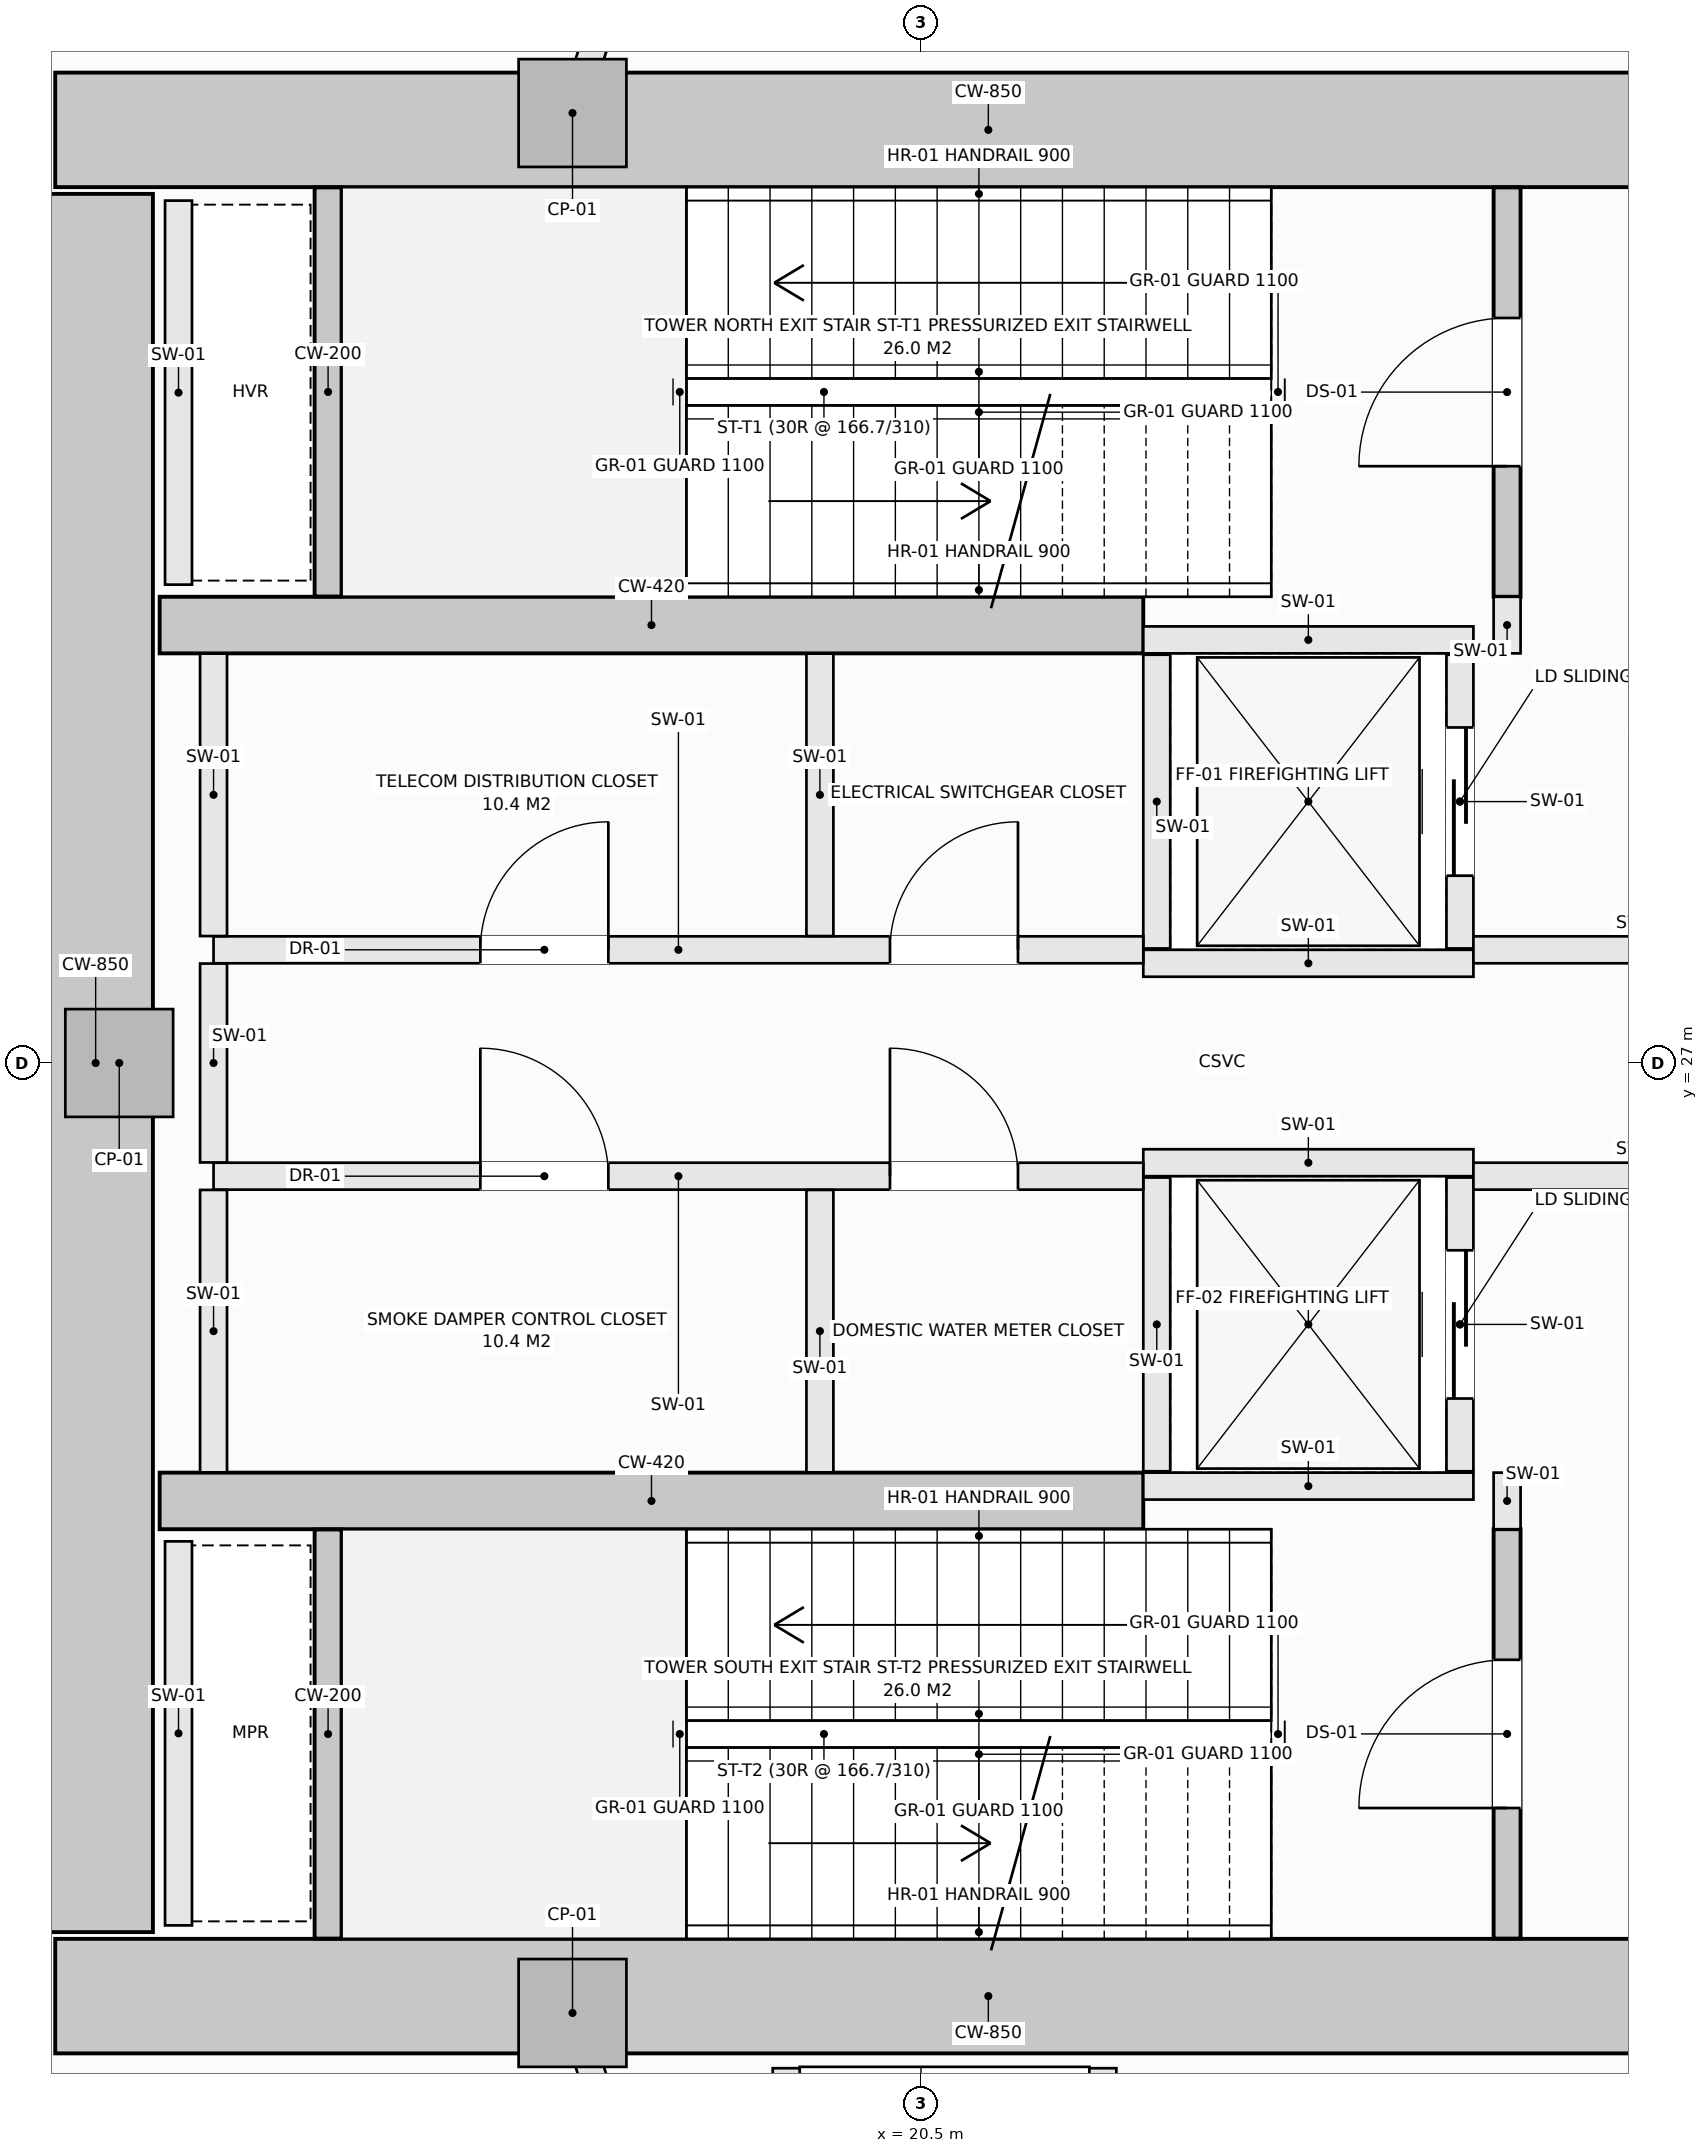
"""IFC4 building model, lengths in metres.
Left out: names, types, materials, properties, quantities, classifications, styles, units other than length and angle.
Written with IfcOpenShell. Run it as: python <this file> out.ifc"""

import sys

from ifc_helpers import new_model, si_unit, direction, frame, frame_2d, origin, origin_2d, place, context, subcontext, project, spatial, rectangle, extrude, element, fill, save


model = new_model("IFC4")
c1 = context("Model", 3, precision=1e-05, world=origin(), true_north=direction((0.0, 1.0)))
c2 = subcontext(c1, "Body", "Model", "MODEL_VIEW")
j1 = project(units=[si_unit("LENGTHUNIT", "METRE"), si_unit("PLANEANGLEUNIT", "RADIAN")], contexts=[c1])
p1 = place(None, origin())
s1 = spatial("IfcSite", under=j1, at=p1, CompositionType="ELEMENT")
p2 = place(p1, origin())
s2 = spatial("IfcBuilding", under=s1, at=p2, CompositionType="ELEMENT")
p3 = place(p2, frame((0.0, 0.0, 95.8)))
s3 = spatial("IfcBuildingStorey", under=s2, at=p3, CompositionType="ELEMENT", Elevation=95.8)
for number, where, z_axis, x_axis in (
    (1, (14.075, 33.925, -0.32), (0.0, 0.0, 1.0), (1.0, 0.0, 0.0)),
    (2, (14.075, 20.075, -0.32), (0.0, 0.0, 1.0), (1.0, 0.0, 0.0)),
):
    element("IfcWall", number, at=place(p3, frame(where, z_axis=z_axis, x_axis=x_axis)), inside=s3, PredefinedType="SHEAR", context=c2, shape_type="SweptSolid", body=[
        extrude(rectangle(XDim=13.85, YDim=0.85, at=frame_2d((6.925, 0.0))), origin(), (0.0, 0.0, 1.0), 5.04),
    ])
p4 = place(p3, frame((14.375, 20.55, -0.32), z_axis=(0.0, 0.0, 1.0), x_axis=(0.0, 1.0, 0.0)))
e3 = element("IfcWall", 3, at=p4, inside=s3, PredefinedType="SHEAR", context=c2, shape_type="SweptSolid", body=[
    extrude(rectangle(XDim=12.9, YDim=0.85, at=frame_2d((6.45, 0.0))), origin(), (0.0, 0.0, 1.0), 5.04),
])
for number, where, z_axis, x_axis in (
    (4, (14.85, 30.25, -0.32), (0.0, 0.0, 1.0), (1.0, 0.0, 0.0)),
    (5, (14.85, 23.75, -0.32), (0.0, 0.0, 1.0), (1.0, 0.0, 0.0)),
):
    element("IfcWall", number, at=place(p3, frame(where, z_axis=z_axis, x_axis=x_axis)), inside=s3, PredefinedType="SHEAR", context=c2, shape_type="SweptSolid", body=[
        extrude(rectangle(XDim=7.3, YDim=0.42, at=frame_2d((3.65, 0.0))), origin(), (0.0, 0.0, 1.0), 5.04),
    ])
for number, where, z_axis, x_axis in (
    (6, (17.914, 34.05, -0.32), (0.0, 0.0, 1.0), (1.0, 0.0, 0.0)),
    (7, (14.55, 27.0, -0.32), (0.0, 0.0, 1.0), (1.0, 0.0, 0.0)),
    (8, (17.914, 19.95, -0.32), (0.0, 0.0, 1.0), (1.0, 0.0, 0.0)),
):
    element("IfcColumn", number, at=place(p3, frame(where, z_axis=z_axis, x_axis=x_axis)), inside=s3, PredefinedType="PILASTER", context=c2, shape_type="SweptSolid", body=[
        extrude(rectangle(XDim=0.8, YDim=0.8, at=origin_2d()), origin(), (0.0, 0.0, 1.0), 5.04),
    ])
p5 = place(p3, frame((24.85, 30.46, -0.32), z_axis=(0.0, 0.0, 1.0), x_axis=(0.0, 1.0, 0.0)))
e9 = element("IfcWall", 9, at=p5, inside=s3, PredefinedType="SHEAR", context=c2, shape_type="SweptSolid", body=[
    extrude(rectangle(XDim=3.038, YDim=0.2, at=frame_2d((1.519, 0.0))), origin(), (0.0, 0.0, 1.0), 5.04),
])
p6 = place(p5, frame((0.969, 0.0, 0.32)))
e10 = element("IfcOpeningElement", 10, at=p6, cuts=e9, PredefinedType="OPENING", context=c2, shape_type="SweptSolid", body=[
    extrude(rectangle(XDim=1.1, YDim=2.15, at=frame_2d((0.55, 1.075))), frame((0.0, 0.11, 0.0), z_axis=(0.0, -1.0, 0.0), x_axis=(1.0, 0.0, 0.0)), (0.0, 0.0, 1.0), 0.22),
])
p7 = place(p3, frame((16.1, 30.462, -0.32), z_axis=(0.0, 0.0, 1.0), x_axis=(0.0, 1.0, 0.0)))
e11 = element("IfcWall", 11, at=p7, inside=s3, PredefinedType="SHEAR", context=c2, shape_type="SweptSolid", body=[
    extrude(rectangle(XDim=3.036, YDim=0.2, at=frame_2d((1.518, 0.0))), origin(), (0.0, 0.0, 1.0), 5.04),
])
p8 = place(p3, frame((24.85, 20.502, -0.32), z_axis=(0.0, 0.0, 1.0), x_axis=(0.0, 1.0, 0.0)))
e12 = element("IfcWall", 12, at=p8, inside=s3, PredefinedType="SHEAR", context=c2, shape_type="SweptSolid", body=[
    extrude(rectangle(XDim=3.038, YDim=0.2, at=frame_2d((1.519, 0.0))), origin(), (0.0, 0.0, 1.0), 5.04),
])
p9 = place(p8, frame((0.969, 0.0, 0.32)))
e13 = element("IfcOpeningElement", 13, at=p9, cuts=e12, PredefinedType="OPENING", context=c2, shape_type="SweptSolid", body=[
    extrude(rectangle(XDim=1.1, YDim=2.15, at=frame_2d((0.55, 1.075))), frame((0.0, 0.11, 0.0), z_axis=(0.0, -1.0, 0.0), x_axis=(1.0, 0.0, 0.0)), (0.0, 0.0, 1.0), 0.22),
])
p10 = place(p3, frame((16.1, 20.502, -0.32), z_axis=(0.0, 0.0, 1.0), x_axis=(0.0, 1.0, 0.0)))
e14 = element("IfcWall", 14, at=p10, inside=s3, PredefinedType="SHEAR", context=c2, shape_type="SweptSolid", body=[
    extrude(rectangle(XDim=3.036, YDim=0.2, at=frame_2d((1.518, 0.0))), origin(), (0.0, 0.0, 1.0), 5.04),
])
for number, where, z_axis, x_axis in (
    (15, (22.15, 30.14, 0.0), (0.0, 0.0, 1.0), (1.0, 0.0, 0.0)),
    (16, (22.15, 27.74, 0.0), (0.0, 0.0, 1.0), (1.0, 0.0, 0.0)),
):
    element("IfcWall", number, at=place(p3, frame(where, z_axis=z_axis, x_axis=x_axis)), inside=s3, PredefinedType="SOLIDWALL", context=c2, shape_type="SweptSolid", body=[
        extrude(rectangle(XDim=2.45, YDim=0.2, at=frame_2d((1.225, 0.0))), origin(), (0.0, 0.0, 1.0), 4.72),
    ])
p11 = place(p3, frame((22.25, 27.85, 0.0), z_axis=(0.0, 0.0, 1.0), x_axis=(0.0, 1.0, 0.0)))
e17 = element("IfcWall", 17, at=p11, inside=s3, PredefinedType="SOLIDWALL", context=c2, shape_type="SweptSolid", body=[
    extrude(rectangle(XDim=2.18, YDim=0.2, at=frame_2d((1.09, 0.0))), origin(), (0.0, 0.0, 1.0), 4.72),
])
p12 = place(p3, frame((24.5, 27.85, 0.0), z_axis=(0.0, 0.0, 1.0), x_axis=(0.0, 1.0, 0.0)))
e18 = element("IfcWall", 18, at=p12, inside=s3, PredefinedType="SOLIDWALL", context=c2, shape_type="SweptSolid", body=[
    extrude(rectangle(XDim=2.18, YDim=0.2, at=frame_2d((1.09, 0.0))), origin(), (0.0, 0.0, 1.0), 4.72),
])
p13 = place(p12, frame((0.54, 0.0, 0.0)))
e19 = element("IfcOpeningElement", 19, at=p13, cuts=e18, PredefinedType="OPENING", context=c2, shape_type="SweptSolid", body=[
    extrude(rectangle(XDim=1.1, YDim=2.2, at=frame_2d((0.55, 1.1))), frame((0.0, 0.11, 0.0), z_axis=(0.0, -1.0, 0.0), x_axis=(1.0, 0.0, 0.0)), (0.0, 0.0, 1.0), 0.22),
])
for number, where, z_axis, x_axis in (
    (20, (22.15, 26.26, 0.0), (0.0, 0.0, 1.0), (1.0, 0.0, 0.0)),
    (21, (22.15, 23.86, 0.0), (0.0, 0.0, 1.0), (1.0, 0.0, 0.0)),
):
    element("IfcWall", number, at=place(p3, frame(where, z_axis=z_axis, x_axis=x_axis)), inside=s3, PredefinedType="SOLIDWALL", context=c2, shape_type="SweptSolid", body=[
        extrude(rectangle(XDim=2.45, YDim=0.2, at=frame_2d((1.225, 0.0))), origin(), (0.0, 0.0, 1.0), 4.72),
    ])
p14 = place(p3, frame((22.25, 23.97, 0.0), z_axis=(0.0, 0.0, 1.0), x_axis=(0.0, 1.0, 0.0)))
e22 = element("IfcWall", 22, at=p14, inside=s3, PredefinedType="SOLIDWALL", context=c2, shape_type="SweptSolid", body=[
    extrude(rectangle(XDim=2.18, YDim=0.2, at=frame_2d((1.09, 0.0))), origin(), (0.0, 0.0, 1.0), 4.72),
])
p15 = place(p3, frame((24.5, 23.97, 0.0), z_axis=(0.0, 0.0, 1.0), x_axis=(0.0, 1.0, 0.0)))
e23 = element("IfcWall", 23, at=p15, inside=s3, PredefinedType="SOLIDWALL", context=c2, shape_type="SweptSolid", body=[
    extrude(rectangle(XDim=2.18, YDim=0.2, at=frame_2d((1.09, 0.0))), origin(), (0.0, 0.0, 1.0), 4.72),
])
p16 = place(p15, frame((0.54, 0.0, 0.0)))
e24 = element("IfcOpeningElement", 24, at=p16, cuts=e23, PredefinedType="OPENING", context=c2, shape_type="SweptSolid", body=[
    extrude(rectangle(XDim=1.1, YDim=2.2, at=frame_2d((0.55, 1.1))), frame((0.0, 0.11, 0.0), z_axis=(0.0, -1.0, 0.0), x_axis=(1.0, 0.0, 0.0)), (0.0, 0.0, 1.0), 0.22),
])
for number, where, z_axis, x_axis in (
    (25, (19.5, 17.01, 0.0), (0.0, 0.0, 1.0), (0.0, 1.0, 0.0)),
    (26, (21.85, 17.01, 0.0), (0.0, 0.0, 1.0), (0.0, 1.0, 0.0)),
):
    element("IfcWall", number, at=place(p3, frame(where, z_axis=z_axis, x_axis=x_axis)), inside=s3, PredefinedType="SOLIDWALL", context=c2, shape_type="SweptSolid", body=[
        extrude(rectangle(XDim=2.53, YDim=0.2, at=frame_2d((1.265, 0.0))), origin(), (0.0, 0.0, 1.0), 4.72),
    ])
for number, where, z_axis, x_axis in (
    (27, (14.99, 30.55, 0.0), (0.0, 0.0, 1.0), (0.0, 1.0, 0.0)),
    (28, (14.99, 20.6, 0.0), (0.0, 0.0, 1.0), (0.0, 1.0, 0.0)),
):
    element("IfcWall", number, at=place(p3, frame(where, z_axis=z_axis, x_axis=x_axis)), inside=s3, PredefinedType="SOLIDWALL", context=c2, shape_type="SweptSolid", body=[
        extrude(rectangle(XDim=2.85, YDim=0.2, at=frame_2d((1.425, 0.0))), origin(), (0.0, 0.0, 1.0), 4.72),
    ])
for number, where, z_axis, x_axis in (
    (29, (24.85, 23.54, 0.0), (0.0, 0.0, 1.0), (0.0, 1.0, 0.0)),
    (30, (24.85, 30.04, 0.0), (0.0, 0.0, 1.0), (0.0, 1.0, 0.0)),
):
    element("IfcWall", number, at=place(p3, frame(where, z_axis=z_axis, x_axis=x_axis)), inside=s3, PredefinedType="SOLIDWALL", context=c2, shape_type="SweptSolid", body=[
        extrude(rectangle(XDim=0.42, YDim=0.2, at=frame_2d((0.21, 0.0))), origin(), (0.0, 0.0, 1.0), 4.72),
    ])
p17 = place(p3, frame((15.25, 27.84, 0.0), z_axis=(0.0, 0.0, 1.0), x_axis=(1.0, 0.0, 0.0)))
e31 = element("IfcWall", 31, at=p17, inside=s3, PredefinedType="SOLIDWALL", context=c2, shape_type="SweptSolid", body=[
    extrude(rectangle(XDim=6.9, YDim=0.2, at=frame_2d((3.45, 0.0))), origin(), (0.0, 0.0, 1.0), 4.72),
])
p18 = place(p17, frame((5.02, 0.0, 0.0)))
e32 = element("IfcOpeningElement", 32, at=p18, cuts=e31, PredefinedType="OPENING", context=c2, shape_type="SweptSolid", body=[
    extrude(rectangle(XDim=0.95, YDim=2.1, at=frame_2d((0.475, 1.05))), frame((0.0, 0.11, 0.0), z_axis=(0.0, -1.0, 0.0), x_axis=(1.0, 0.0, 0.0)), (0.0, 0.0, 1.0), 0.22),
])
p19 = place(p17, frame((1.98, 0.0, 0.0)))
e33 = element("IfcOpeningElement", 33, at=p19, cuts=e31, PredefinedType="OPENING", context=c2, shape_type="SweptSolid", body=[
    extrude(rectangle(XDim=0.95, YDim=2.1, at=frame_2d((0.475, 1.05))), frame((0.0, 0.11, 0.0), z_axis=(0.0, -1.0, 0.0), x_axis=(1.0, 0.0, 0.0)), (0.0, 0.0, 1.0), 0.22),
])
p20 = place(p3, frame((24.6, 27.84, 0.0), z_axis=(0.0, 0.0, 1.0), x_axis=(1.0, 0.0, 0.0)))
e34 = element("IfcWall", 34, at=p20, inside=s3, PredefinedType="SOLIDWALL", context=c2, shape_type="SweptSolid", body=[
    extrude(rectangle(XDim=2.918, YDim=0.2, at=frame_2d((1.459, 0.0))), origin(), (0.0, 0.0, 1.0), 4.72),
])
p21 = place(p3, frame((15.25, 26.16, 0.0), z_axis=(0.0, 0.0, 1.0), x_axis=(1.0, 0.0, 0.0)))
e35 = element("IfcWall", 35, at=p21, inside=s3, PredefinedType="SOLIDWALL", context=c2, shape_type="SweptSolid", body=[
    extrude(rectangle(XDim=6.9, YDim=0.2, at=frame_2d((3.45, 0.0))), origin(), (0.0, 0.0, 1.0), 4.72),
])
p22 = place(p21, frame((5.02, 0.0, 0.0)))
e36 = element("IfcOpeningElement", 36, at=p22, cuts=e35, PredefinedType="OPENING", context=c2, shape_type="SweptSolid", body=[
    extrude(rectangle(XDim=0.95, YDim=2.1, at=frame_2d((0.475, 1.05))), frame((0.0, 0.11, 0.0), z_axis=(0.0, -1.0, 0.0), x_axis=(1.0, 0.0, 0.0)), (0.0, 0.0, 1.0), 0.22),
])
p23 = place(p21, frame((1.98, 0.0, 0.0)))
e37 = element("IfcOpeningElement", 37, at=p23, cuts=e35, PredefinedType="OPENING", context=c2, shape_type="SweptSolid", body=[
    extrude(rectangle(XDim=0.95, YDim=2.1, at=frame_2d((0.475, 1.05))), frame((0.0, 0.11, 0.0), z_axis=(0.0, -1.0, 0.0), x_axis=(1.0, 0.0, 0.0)), (0.0, 0.0, 1.0), 0.22),
])
p24 = place(p3, frame((24.6, 26.16, 0.0), z_axis=(0.0, 0.0, 1.0), x_axis=(1.0, 0.0, 0.0)))
e38 = element("IfcWall", 38, at=p24, inside=s3, PredefinedType="SOLIDWALL", context=c2, shape_type="SweptSolid", body=[
    extrude(rectangle(XDim=2.918, YDim=0.2, at=frame_2d((1.459, 0.0))), origin(), (0.0, 0.0, 1.0), 4.72),
])
p25 = place(p3, frame((15.25, 23.962, 0.0), z_axis=(0.0, 0.0, 1.0), x_axis=(0.0, 1.0, 0.0)))
e39 = element("IfcWall", 39, at=p25, inside=s3, PredefinedType="SOLIDWALL", context=c2, shape_type="SweptSolid", body=[
    extrude(rectangle(XDim=2.096, YDim=0.2, at=frame_2d((1.048, 0.0))), origin(), (0.0, 0.0, 1.0), 4.72),
])
p26 = place(p3, frame((15.25, 26.262, 0.0), z_axis=(0.0, 0.0, 1.0), x_axis=(0.0, 1.0, 0.0)))
e40 = element("IfcWall", 40, at=p26, inside=s3, PredefinedType="SOLIDWALL", context=c2, shape_type="SweptSolid", body=[
    extrude(rectangle(XDim=1.476, YDim=0.2, at=frame_2d((0.738, 0.0))), origin(), (0.0, 0.0, 1.0), 4.72),
])
for number, where, z_axis, x_axis in (
    (41, (15.25, 27.942, 0.0), (0.0, 0.0, 1.0), (0.0, 1.0, 0.0)),
    (42, (19.75, 23.962, 0.0), (0.0, 0.0, 1.0), (0.0, 1.0, 0.0)),
    (43, (19.75, 27.942, 0.0), (0.0, 0.0, 1.0), (0.0, 1.0, 0.0)),
):
    element("IfcWall", number, at=place(p3, frame(where, z_axis=z_axis, x_axis=x_axis)), inside=s3, PredefinedType="SOLIDWALL", context=c2, shape_type="SweptSolid", body=[
        extrude(rectangle(XDim=2.096, YDim=0.2, at=frame_2d((1.048, 0.0))), origin(), (0.0, 0.0, 1.0), 4.72),
    ])
p27 = place(p3, frame((18.01, 19.648, 0.0), z_axis=(0.0, 0.0, 1.0), x_axis=(0.30441390655, -0.952539854021, 0.0)))
e44 = element("IfcWall", 44, at=p27, inside=s3, PredefinedType="SOLIDWALL", context=c2, shape_type="SweptSolid", body=[
    extrude(rectangle(XDim=0.833, YDim=0.2, at=frame_2d((0.416, 0.0))), origin(), (0.0, 0.0, 1.0), 4.084),
])
p28 = place(p3, frame((18.01, 34.352, 0.0), z_axis=(0.0, 0.0, 1.0), x_axis=(0.304472538645, 0.952521114312, 0.0)))
e45 = element("IfcWall", 45, at=p28, inside=s3, PredefinedType="SOLIDWALL", context=c2, shape_type="SweptSolid", body=[
    extrude(rectangle(XDim=0.73, YDim=0.2, at=frame_2d((0.365, 0.0))), origin(), (0.0, 0.0, 1.0), 4.72),
])
p29 = place(p6, origin())
e46 = element("IfcDoor", 46, at=p29, inside=s3, OperationType="SINGLE_SWING_LEFT", PredefinedType="DOOR", context=c2, shape_type="SweptSolid", body=[
    extrude(rectangle(XDim=1.1, YDim=2.15, at=frame_2d((0.55, 1.075))), frame((0.0, 0.025, 0.0), z_axis=(0.0, -1.0, 0.0), x_axis=(1.0, 0.0, 0.0)), (0.0, 0.0, 1.0), 0.05),
])
fill(e10, e46)
p30 = place(p9, origin())
e47 = element("IfcDoor", 47, at=p30, inside=s3, OperationType="SINGLE_SWING_LEFT", PredefinedType="DOOR", context=c2, shape_type="SweptSolid", body=[
    extrude(rectangle(XDim=1.1, YDim=2.15, at=frame_2d((0.55, 1.075))), frame((0.0, 0.025, 0.0), z_axis=(0.0, -1.0, 0.0), x_axis=(1.0, 0.0, 0.0)), (0.0, 0.0, 1.0), 0.05),
])
fill(e13, e47)
p31 = place(p13, origin())
e48 = element("IfcDoor", 48, at=p31, inside=s3, OperationType="SLIDING_TO_LEFT", PredefinedType="DOOR", context=c2, shape_type="SweptSolid", body=[
    extrude(rectangle(XDim=1.1, YDim=2.2, at=frame_2d((0.55, 1.1))), frame((0.0, 0.025, 0.0), z_axis=(0.0, -1.0, 0.0), x_axis=(1.0, 0.0, 0.0)), (0.0, 0.0, 1.0), 0.05),
])
fill(e19, e48)
p32 = place(p16, origin())
e49 = element("IfcDoor", 49, at=p32, inside=s3, OperationType="SLIDING_TO_LEFT", PredefinedType="DOOR", context=c2, shape_type="SweptSolid", body=[
    extrude(rectangle(XDim=1.1, YDim=2.2, at=frame_2d((0.55, 1.1))), frame((0.0, 0.025, 0.0), z_axis=(0.0, -1.0, 0.0), x_axis=(1.0, 0.0, 0.0)), (0.0, 0.0, 1.0), 0.05),
])
fill(e24, e49)
p33 = place(p18, origin())
e50 = element("IfcDoor", 50, at=p33, inside=s3, OperationType="SINGLE_SWING_RIGHT", PredefinedType="DOOR", context=c2, shape_type="SweptSolid", body=[
    extrude(rectangle(XDim=0.95, YDim=2.1, at=frame_2d((0.475, 1.05))), frame((0.0, 0.025, 0.0), z_axis=(0.0, -1.0, 0.0), x_axis=(1.0, 0.0, 0.0)), (0.0, 0.0, 1.0), 0.05),
])
fill(e32, e50)
p34 = place(p22, origin())
e51 = element("IfcDoor", 51, at=p34, inside=s3, OperationType="SINGLE_SWING_LEFT", PredefinedType="DOOR", context=c2, shape_type="SweptSolid", body=[
    extrude(rectangle(XDim=0.95, YDim=2.1, at=frame_2d((0.475, 1.05))), frame((0.0, 0.025, 0.0), z_axis=(0.0, -1.0, 0.0), x_axis=(1.0, 0.0, 0.0)), (0.0, 0.0, 1.0), 0.05),
])
fill(e36, e51)
p35 = place(p19, origin())
e52 = element("IfcDoor", 52, at=p35, inside=s3, OperationType="SINGLE_SWING_RIGHT", PredefinedType="DOOR", context=c2, shape_type="SweptSolid", body=[
    extrude(rectangle(XDim=0.95, YDim=2.1, at=frame_2d((0.475, 1.05))), frame((0.0, 0.025, 0.0), z_axis=(0.0, -1.0, 0.0), x_axis=(1.0, 0.0, 0.0)), (0.0, 0.0, 1.0), 0.05),
])
fill(e33, e52)
p36 = place(p23, origin())
e53 = element("IfcDoor", 53, at=p36, inside=s3, OperationType="SINGLE_SWING_LEFT", PredefinedType="DOOR", context=c2, shape_type="SweptSolid", body=[
    extrude(rectangle(XDim=0.95, YDim=2.1, at=frame_2d((0.475, 1.05))), frame((0.0, 0.025, 0.0), z_axis=(0.0, -1.0, 0.0), x_axis=(1.0, 0.0, 0.0)), (0.0, 0.0, 1.0), 0.05),
])
fill(e37, e53)
save(model, sys.argv[1])
